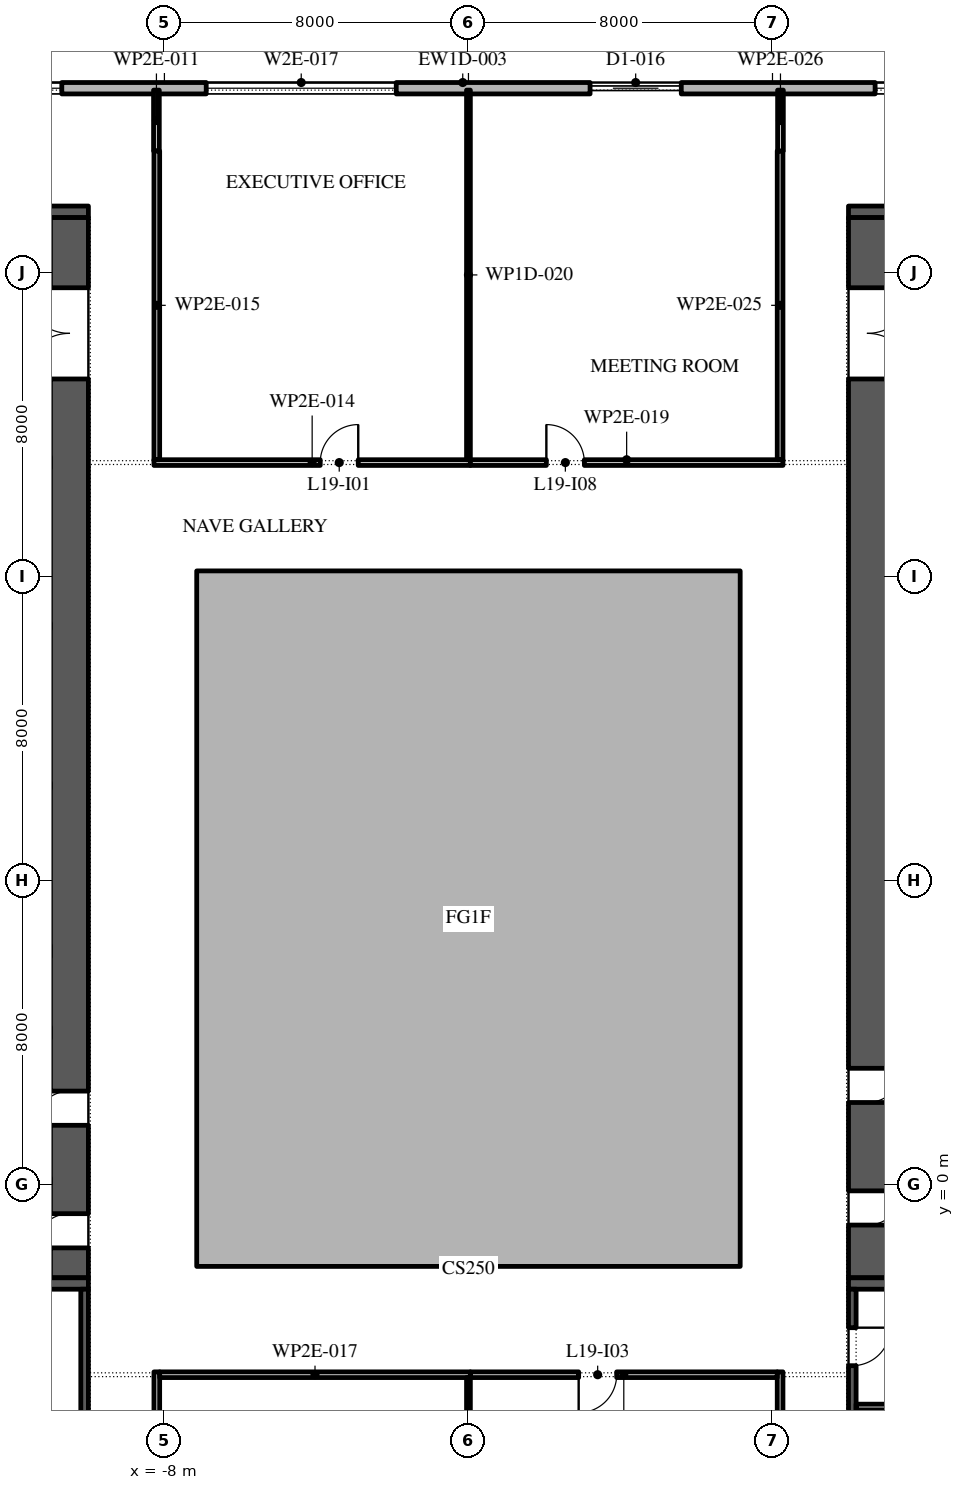
"""IFC4 building model, lengths in metres.
Left out: names, types, materials, properties, quantities, classifications, styles, units other than length and angle.
Written with IfcOpenShell. Run it as: python <this file> out.ifc"""

import sys

from ifc_helpers import new_model, si_unit, direction, frame, frame_2d, origin, place, context, subcontext, project, spatial, polyline, rectangle, outline, extrude, element, fill, save


model = new_model("IFC4")
c1 = context("Model", 3, precision=1e-05, world=origin(), true_north=direction((0.0, 1.0)))
c2 = subcontext(c1, "Body", "Model", "MODEL_VIEW")
j1 = project(units=[si_unit("LENGTHUNIT", "METRE"), si_unit("PLANEANGLEUNIT", "RADIAN")], contexts=[c1])
p1 = place(None, origin())
s1 = spatial("IfcSite", under=j1, at=p1, CompositionType="ELEMENT")
p2 = place(p1, origin())
s2 = spatial("IfcBuilding", under=s1, at=p2, CompositionType="ELEMENT")
p3 = place(p2, frame((0.0, 0.0, 90.0)))
s3 = spatial("IfcBuildingStorey", under=s2, at=p3, CompositionType="ELEMENT", Elevation=90.0)
p4 = place(p3, origin())
e1 = element("IfcWall", 1, at=p4, inside=s3, PredefinedType="STANDARD", context=c2, shape_type="SweptSolid", body=[
    extrude(outline(polyline([(-7.15, -2.15), (7.15, -2.15), (7.15, 16.15), (-7.15, 16.15), (-7.15, -2.15)]), holes=[polyline([(-7.0, -2.0), (-7.0, 16.0), (7.0, 16.0), (7.0, -2.0), (-7.0, -2.0)])]), origin(), (0.0, 0.0, 1.0), 3.9),
])
p5 = place(p3, frame((26.1, 28.85, 0.0), z_axis=(0.0, 0.0, 1.0), x_axis=(-1.0, 0.0, 0.0)))
e2 = element("IfcWall", 2, at=p5, inside=s3, PredefinedType="STANDARD", context=c2, shape_type="SweptSolid", body=[
    extrude(rectangle(XDim=52.5, YDim=0.3, at=frame_2d((26.25, 0.0))), origin(), (0.0, 0.0, 1.0), 3.9),
])
p6 = place(p5, frame((1.75, 0.0, 0.45)))
e3 = element("IfcOpeningElement", 3, at=p6, cuts=e2, PredefinedType="OPENING", context=c2, shape_type="SweptSolid", body=[
    extrude(rectangle(XDim=5.0, YDim=2.775, at=frame_2d((2.5, 1.387))), frame((0.0, 0.16, 0.0), z_axis=(0.0, -1.0, 0.0), x_axis=(1.0, 0.0, 0.0)), (0.0, 0.0, 1.0), 0.32),
])
p7 = place(p5, frame((10.4, 0.0, 0.45)))
e4 = element("IfcOpeningElement", 4, at=p7, cuts=e2, PredefinedType="OPENING", context=c2, shape_type="SweptSolid", body=[
    extrude(rectangle(XDim=5.0, YDim=2.775, at=frame_2d((2.5, 1.387))), frame((0.0, 0.16, 0.0), z_axis=(0.0, -1.0, 0.0), x_axis=(1.0, 0.0, 0.0)), (0.0, 0.0, 1.0), 0.32),
])
p8 = place(p5, frame((20.5, 0.0, 0.0)))
e5 = element("IfcOpeningElement", 5, at=p8, cuts=e2, PredefinedType="OPENING", context=c2, shape_type="SweptSolid", body=[
    extrude(rectangle(XDim=2.4, YDim=3.5, at=frame_2d((1.2, 1.75))), frame((0.0, 0.16, 0.0), z_axis=(0.0, -1.0, 0.0), x_axis=(1.0, 0.0, 0.0)), (0.0, 0.0, 1.0), 0.32),
])
p9 = place(p5, frame((28.0, 0.0, 0.45)))
e6 = element("IfcOpeningElement", 6, at=p9, cuts=e2, PredefinedType="OPENING", context=c2, shape_type="SweptSolid", body=[
    extrude(rectangle(XDim=5.0, YDim=2.775, at=frame_2d((2.5, 1.387))), frame((0.0, 0.16, 0.0), z_axis=(0.0, -1.0, 0.0), x_axis=(1.0, 0.0, 0.0)), (0.0, 0.0, 1.0), 0.32),
])
p10 = place(p5, frame((36.8, 0.0, 0.45)))
e7 = element("IfcOpeningElement", 7, at=p10, cuts=e2, PredefinedType="OPENING", context=c2, shape_type="SweptSolid", body=[
    extrude(rectangle(XDim=5.0, YDim=2.775, at=frame_2d((2.5, 1.387))), frame((0.0, 0.16, 0.0), z_axis=(0.0, -1.0, 0.0), x_axis=(1.0, 0.0, 0.0)), (0.0, 0.0, 1.0), 0.32),
])
p11 = place(p5, frame((45.6, 0.0, 0.45)))
e8 = element("IfcOpeningElement", 8, at=p11, cuts=e2, PredefinedType="OPENING", context=c2, shape_type="SweptSolid", body=[
    extrude(rectangle(XDim=5.0, YDim=2.775, at=frame_2d((2.5, 1.387))), frame((0.0, 0.16, 0.0), z_axis=(0.0, -1.0, 0.0), x_axis=(1.0, 0.0, 0.0)), (0.0, 0.0, 1.0), 0.32),
])
p12 = place(p3, frame((-10.5, -2.45, 0.0), z_axis=(0.0, 0.0, 1.0), x_axis=(0.0, 1.0, 0.0)))
e9 = element("IfcWall", 9, at=p12, inside=s3, PredefinedType="SHEAR", context=c2, shape_type="SweptSolid", body=[
    extrude(rectangle(XDim=27.9, YDim=1.0, at=frame_2d((13.95, 0.0))), origin(), (0.0, 0.0, 1.0), 3.9),
])
p13 = place(p12, frame((23.65, 0.0, 0.0)))
e10 = element("IfcOpeningElement", 10, at=p13, cuts=e9, PredefinedType="OPENING", context=c2, shape_type="SweptSolid", body=[
    extrude(rectangle(XDim=2.4, YDim=2.1, at=frame_2d((1.2, 1.05))), frame((0.0, 0.51, 0.0), z_axis=(0.0, -1.0, 0.0), x_axis=(1.0, 0.0, 0.0)), (0.0, 0.0, 1.0), 1.02),
])
p14 = place(p12, frame((0.788, 0.0, 0.0)))
e11 = element("IfcOpeningElement", 11, at=p14, cuts=e9, PredefinedType="OPENING", context=c2, shape_type="SweptSolid", body=[
    extrude(rectangle(XDim=0.9, YDim=2.1, at=frame_2d((0.45, 1.05))), frame((0.0, 0.51, 0.0), z_axis=(0.0, -1.0, 0.0), x_axis=(1.0, 0.0, 0.0)), (0.0, 0.0, 1.0), 1.02),
])
p15 = place(p12, frame((4.012, 0.0, 0.0)))
e12 = element("IfcOpeningElement", 12, at=p15, cuts=e9, PredefinedType="OPENING", context=c2, shape_type="SweptSolid", body=[
    extrude(rectangle(XDim=0.9, YDim=2.1, at=frame_2d((0.45, 1.05))), frame((0.0, 0.51, 0.0), z_axis=(0.0, -1.0, 0.0), x_axis=(1.0, 0.0, 0.0)), (0.0, 0.0, 1.0), 1.02),
])
for number, where, z_axis, x_axis in (
    (13, (-22.0, -2.6, 0.0), (0.0, 0.0, 1.0), (1.0, 0.0, 0.0)),
    (14, (-22.0, 25.6, 0.0), (0.0, 0.0, 1.0), (1.0, 0.0, 0.0)),
):
    element("IfcWall", number, at=place(p3, frame(where, z_axis=z_axis, x_axis=x_axis)), inside=s3, PredefinedType="SHEAR", context=c2, shape_type="SweptSolid", body=[
        extrude(rectangle(XDim=12.0, YDim=0.3, at=frame_2d((6.0, 0.0))), origin(), (0.0, 0.0, 1.0), 3.9),
    ])
p16 = place(p3, frame((-10.1, -15.8, 0.0), z_axis=(0.0, 0.0, 1.0), x_axis=(0.0, 1.0, 0.0)))
e15 = element("IfcWall", 15, at=p16, inside=s3, PredefinedType="SHEAR", context=c2, shape_type="SweptSolid", body=[
    extrude(rectangle(XDim=13.05, YDim=0.2, at=frame_2d((6.525, 0.0))), origin(), (0.0, 0.0, 1.0), 3.9),
])
p17 = place(p16, frame((6.075, 0.0, 0.0)))
e16 = element("IfcOpeningElement", 16, at=p17, cuts=e15, PredefinedType="OPENING", context=c2, shape_type="SweptSolid", body=[
    extrude(rectangle(XDim=0.9, YDim=2.1, at=frame_2d((0.45, 1.05))), frame((0.0, 0.11, 0.0), z_axis=(0.0, -1.0, 0.0), x_axis=(1.0, 0.0, 0.0)), (0.0, 0.0, 1.0), 0.22),
])
p18 = place(p3, frame((10.5, -2.45, 0.0), z_axis=(0.0, 0.0, 1.0), x_axis=(0.0, 1.0, 0.0)))
e17 = element("IfcWall", 17, at=p18, inside=s3, PredefinedType="SHEAR", context=c2, shape_type="SweptSolid", body=[
    extrude(rectangle(XDim=27.9, YDim=1.0, at=frame_2d((13.95, 0.0))), origin(), (0.0, 0.0, 1.0), 3.9),
])
p19 = place(p18, frame((23.65, 0.0, 0.0)))
e18 = element("IfcOpeningElement", 18, at=p19, cuts=e17, PredefinedType="OPENING", context=c2, shape_type="SweptSolid", body=[
    extrude(rectangle(XDim=2.4, YDim=2.1, at=frame_2d((1.2, 1.05))), frame((0.0, 0.51, 0.0), z_axis=(0.0, -1.0, 0.0), x_axis=(1.0, 0.0, 0.0)), (0.0, 0.0, 1.0), 1.02),
])
p20 = place(p18, frame((1.387, 0.0, 0.0)))
e19 = element("IfcOpeningElement", 19, at=p20, cuts=e17, PredefinedType="OPENING", context=c2, shape_type="SweptSolid", body=[
    extrude(rectangle(XDim=0.9, YDim=2.1, at=frame_2d((0.45, 1.05))), frame((0.0, 0.51, 0.0), z_axis=(0.0, -1.0, 0.0), x_axis=(1.0, 0.0, 0.0)), (0.0, 0.0, 1.0), 1.02),
])
p21 = place(p18, frame((4.613, 0.0, 0.0)))
e20 = element("IfcOpeningElement", 20, at=p21, cuts=e17, PredefinedType="OPENING", context=c2, shape_type="SweptSolid", body=[
    extrude(rectangle(XDim=0.9, YDim=2.1, at=frame_2d((0.45, 1.05))), frame((0.0, 0.51, 0.0), z_axis=(0.0, -1.0, 0.0), x_axis=(1.0, 0.0, 0.0)), (0.0, 0.0, 1.0), 1.02),
])
for number, where, z_axis, x_axis in (
    (21, (10.0, -2.6, 0.0), (0.0, 0.0, 1.0), (1.0, 0.0, 0.0)),
    (22, (10.0, 25.6, 0.0), (0.0, 0.0, 1.0), (1.0, 0.0, 0.0)),
):
    element("IfcWall", number, at=place(p3, frame(where, z_axis=z_axis, x_axis=x_axis)), inside=s3, PredefinedType="SHEAR", context=c2, shape_type="SweptSolid", body=[
        extrude(rectangle(XDim=12.0, YDim=0.3, at=frame_2d((6.0, 0.0))), origin(), (0.0, 0.0, 1.0), 3.9),
    ])
p22 = place(p3, frame((10.1, -15.8, 0.0), z_axis=(0.0, 0.0, 1.0), x_axis=(0.0, 1.0, 0.0)))
e23 = element("IfcWall", 23, at=p22, inside=s3, PredefinedType="SHEAR", context=c2, shape_type="SweptSolid", body=[
    extrude(rectangle(XDim=13.05, YDim=0.2, at=frame_2d((6.525, 0.0))), origin(), (0.0, 0.0, 1.0), 3.9),
])
p23 = place(p22, frame((4.488, 0.0, 0.0)))
e24 = element("IfcOpeningElement", 24, at=p23, cuts=e23, PredefinedType="OPENING", context=c2, shape_type="SweptSolid", body=[
    extrude(rectangle(XDim=0.9, YDim=2.1, at=frame_2d((0.45, 1.05))), frame((0.0, 0.11, 0.0), z_axis=(0.0, -1.0, 0.0), x_axis=(1.0, 0.0, 0.0)), (0.0, 0.0, 1.0), 0.22),
])
p24 = place(p22, frame((11.038, 0.0, 0.0)))
e25 = element("IfcOpeningElement", 25, at=p24, cuts=e23, PredefinedType="OPENING", context=c2, shape_type="SweptSolid", body=[
    extrude(rectangle(XDim=1.0, YDim=2.1, at=frame_2d((0.5, 1.05))), frame((0.0, 0.11, 0.0), z_axis=(0.0, -1.0, 0.0), x_axis=(1.0, 0.0, 0.0)), (0.0, 0.0, 1.0), 0.22),
])
p25 = place(p3, frame((10.2, -5.85, 0.0), z_axis=(0.0, 0.0, 1.0), x_axis=(1.0, 0.0, 0.0)))
e26 = element("IfcWall", 26, at=p25, inside=s3, PredefinedType="PARTITIONING", context=c2, shape_type="SweptSolid", body=[
    extrude(rectangle(XDim=11.6, YDim=0.15, at=frame_2d((5.8, 0.0))), origin(), (0.0, 0.0, 1.0), 3.9),
])
p26 = place(p3, frame((-8.21, 28.8, 0.0), z_axis=(0.0, 0.0, 1.0), x_axis=(0.0, -1.0, 0.0)))
e27 = element("IfcWall", 27, at=p26, inside=s3, PredefinedType="PARTITIONING", context=c2, shape_type="SweptSolid", body=[
    extrude(rectangle(XDim=1.6, YDim=0.15, at=frame_2d((0.8, 0.0))), origin(), (0.0, 0.0, 1.0), 3.9),
])
p27 = place(p3, frame((-8.2, -4.925, 0.0), z_axis=(0.0, 0.0, 1.0), x_axis=(0.0, -1.0, 0.0)))
e28 = element("IfcWall", 28, at=p27, inside=s3, PredefinedType="PARTITIONING", context=c2, shape_type="SweptSolid", body=[
    extrude(rectangle(XDim=12.8, YDim=0.15, at=frame_2d((6.4, 0.0))), origin(), (0.0, 0.0, 1.0), 3.9),
])
p28 = place(p27, frame((5.975, 0.0, 0.0)))
e29 = element("IfcOpeningElement", 29, at=p28, cuts=e28, PredefinedType="OPENING", context=c2, shape_type="SweptSolid", body=[
    extrude(rectangle(XDim=1.0, YDim=2.1, at=frame_2d((0.5, 1.05))), frame((0.0, 0.085, 0.0), z_axis=(0.0, -1.0, 0.0), x_axis=(1.0, 0.0, 0.0)), (0.0, 0.0, 1.0), 0.17),
])
p29 = place(p3, frame((-8.275, 19.0, 0.0), z_axis=(0.0, 0.0, 1.0), x_axis=(1.0, 0.0, 0.0)))
e30 = element("IfcWall", 30, at=p29, inside=s3, PredefinedType="PARTITIONING", context=c2, shape_type="SweptSolid", body=[
    extrude(rectangle(XDim=8.325, YDim=0.15, at=frame_2d((4.163, 0.0))), origin(), (0.0, 0.0, 1.0), 3.9),
])
p30 = place(p29, frame((4.375, 0.0, 0.0)))
e31 = element("IfcOpeningElement", 31, at=p30, cuts=e30, PredefinedType="OPENING", context=c2, shape_type="SweptSolid", body=[
    extrude(rectangle(XDim=1.0, YDim=2.1, at=frame_2d((0.5, 1.05))), frame((0.0, 0.085, 0.0), z_axis=(0.0, -1.0, 0.0), x_axis=(1.0, 0.0, 0.0)), (0.0, 0.0, 1.0), 0.17),
])
p31 = place(p3, frame((-8.2, 27.2, 0.0), z_axis=(0.0, 0.0, 1.0), x_axis=(0.0, -1.0, 0.0)))
e32 = element("IfcWall", 32, at=p31, inside=s3, PredefinedType="PARTITIONING", context=c2, shape_type="SweptSolid", body=[
    extrude(rectangle(XDim=8.125, YDim=0.15, at=frame_2d((4.062, 0.0))), origin(), (0.0, 0.0, 1.0), 3.9),
])
p32 = place(p3, frame((0.05, -5.0, 0.0), z_axis=(0.0, 0.0, 1.0), x_axis=(-1.0, 0.0, 0.0)))
e33 = element("IfcWall", 33, at=p32, inside=s3, PredefinedType="PARTITIONING", context=c2, shape_type="SweptSolid", body=[
    extrude(rectangle(XDim=8.175, YDim=0.15, at=frame_2d((4.087, 0.0))), origin(), (0.0, 0.0, 1.0), 3.9),
])
p33 = place(p3, frame((0.0, -5.075, 0.0), z_axis=(0.0, 0.0, 1.0), x_axis=(0.0, -1.0, 0.0)))
e34 = element("IfcWall", 34, at=p33, inside=s3, PredefinedType="PARTITIONING", context=c2, shape_type="SweptSolid", body=[
    extrude(rectangle(XDim=5.045, YDim=0.1, at=frame_2d((2.522, 0.0))), origin(), (0.0, 0.0, 1.0), 3.9),
])
p34 = place(p3, frame((0.05, 19.0, 0.0), z_axis=(0.0, 0.0, 1.0), x_axis=(1.0, 0.0, 0.0)))
e35 = element("IfcWall", 35, at=p34, inside=s3, PredefinedType="PARTITIONING", context=c2, shape_type="SweptSolid", body=[
    extrude(rectangle(XDim=8.225, YDim=0.15, at=frame_2d((4.112, 0.0))), origin(), (0.0, 0.0, 1.0), 3.9),
])
p35 = place(p34, frame((2.0, 0.0, 0.0)))
e36 = element("IfcOpeningElement", 36, at=p35, cuts=e35, PredefinedType="OPENING", context=c2, shape_type="SweptSolid", body=[
    extrude(rectangle(XDim=1.0, YDim=2.1, at=frame_2d((0.5, 1.05))), frame((0.0, 0.085, 0.0), z_axis=(0.0, -1.0, 0.0), x_axis=(1.0, 0.0, 0.0)), (0.0, 0.0, 1.0), 0.17),
])
p36 = place(p3, frame((0.0, 28.8, 0.0), z_axis=(0.0, 0.0, 1.0), x_axis=(0.0, -1.0, 0.0)))
e37 = element("IfcWall", 37, at=p36, inside=s3, PredefinedType="PARTITIONING", context=c2, shape_type="SweptSolid", body=[
    extrude(rectangle(XDim=9.725, YDim=0.1, at=frame_2d((4.863, 0.0))), origin(), (0.0, 0.0, 1.0), 3.9),
])
p37 = place(p3, frame((8.2, -10.12, 0.0), z_axis=(0.0, 0.0, 1.0), x_axis=(0.0, 1.0, 0.0)))
e38 = element("IfcWall", 38, at=p37, inside=s3, PredefinedType="PARTITIONING", context=c2, shape_type="SweptSolid", body=[
    extrude(rectangle(XDim=5.195, YDim=0.15, at=frame_2d((2.598, 0.0))), origin(), (0.0, 0.0, 1.0), 3.9),
])
p38 = place(p3, frame((8.125, -5.0, 0.0), z_axis=(0.0, 0.0, 1.0), x_axis=(-1.0, 0.0, 0.0)))
e39 = element("IfcWall", 39, at=p38, inside=s3, PredefinedType="PARTITIONING", context=c2, shape_type="SweptSolid", body=[
    extrude(rectangle(XDim=8.075, YDim=0.15, at=frame_2d((4.038, 0.0))), origin(), (0.0, 0.0, 1.0), 3.9),
])
p39 = place(p38, frame((4.225, 0.0, 0.0)))
e40 = element("IfcOpeningElement", 40, at=p39, cuts=e39, PredefinedType="OPENING", context=c2, shape_type="SweptSolid", body=[
    extrude(rectangle(XDim=1.0, YDim=2.1, at=frame_2d((0.5, 1.05))), frame((0.0, 0.085, 0.0), z_axis=(0.0, -1.0, 0.0), x_axis=(1.0, 0.0, 0.0)), (0.0, 0.0, 1.0), 0.17),
])
p40 = place(p3, frame((8.2, 19.075, 0.0), z_axis=(0.0, 0.0, 1.0), x_axis=(0.0, 1.0, 0.0)))
e41 = element("IfcWall", 41, at=p40, inside=s3, PredefinedType="PARTITIONING", context=c2, shape_type="SweptSolid", body=[
    extrude(rectangle(XDim=8.125, YDim=0.15, at=frame_2d((4.062, 0.0))), origin(), (0.0, 0.0, 1.0), 3.9),
])
p41 = place(p3, frame((8.21, 27.2, 0.0), z_axis=(0.0, 0.0, 1.0), x_axis=(0.0, 1.0, 0.0)))
e42 = element("IfcWall", 42, at=p41, inside=s3, PredefinedType="PARTITIONING", context=c2, shape_type="SweptSolid", body=[
    extrude(rectangle(XDim=1.6, YDim=0.15, at=frame_2d((0.8, 0.0))), origin(), (0.0, 0.0, 1.0), 3.9),
])
p42 = place(p7, origin())
e43 = element("IfcWindow", 43, at=p42, inside=s3, PartitioningType="DOUBLE_PANEL_VERTICAL", PredefinedType="WINDOW", context=c2, shape_type="SweptSolid", body=[
    extrude(rectangle(XDim=5.0, YDim=2.775, at=frame_2d((2.5, 1.387))), frame((0.0, 0.03, 0.0), z_axis=(0.0, -1.0, 0.0), x_axis=(1.0, 0.0, 0.0)), (0.0, 0.0, 1.0), 0.06),
])
fill(e4, e43)
p43 = place(p8, origin())
e44 = element("IfcDoor", 44, at=p43, inside=s3, OperationType="DOUBLE_DOOR_SLIDING", PredefinedType="DOOR", context=c2, shape_type="SweptSolid", body=[
    extrude(rectangle(XDim=2.4, YDim=3.5, at=frame_2d((1.2, 1.75))), frame((0.0, 0.025, 0.0), z_axis=(0.0, -1.0, 0.0), x_axis=(1.0, 0.0, 0.0)), (0.0, 0.0, 1.0), 0.05),
])
fill(e5, e44)
p44 = place(p9, origin())
e45 = element("IfcWindow", 45, at=p44, inside=s3, PartitioningType="DOUBLE_PANEL_VERTICAL", PredefinedType="WINDOW", context=c2, shape_type="SweptSolid", body=[
    extrude(rectangle(XDim=5.0, YDim=2.775, at=frame_2d((2.5, 1.387))), frame((0.0, 0.03, 0.0), z_axis=(0.0, -1.0, 0.0), x_axis=(1.0, 0.0, 0.0)), (0.0, 0.0, 1.0), 0.06),
])
fill(e6, e45)
p45 = place(p10, origin())
e46 = element("IfcWindow", 46, at=p45, inside=s3, PartitioningType="DOUBLE_PANEL_VERTICAL", PredefinedType="WINDOW", context=c2, shape_type="SweptSolid", body=[
    extrude(rectangle(XDim=5.0, YDim=2.775, at=frame_2d((2.5, 1.387))), frame((0.0, 0.03, 0.0), z_axis=(0.0, -1.0, 0.0), x_axis=(1.0, 0.0, 0.0)), (0.0, 0.0, 1.0), 0.06),
])
fill(e7, e46)
p46 = place(p13, origin())
e47 = element("IfcDoor", 47, at=p46, inside=s3, OperationType="DOUBLE_DOOR_SINGLE_SWING", PredefinedType="DOOR", context=c2, shape_type="SweptSolid", body=[
    extrude(rectangle(XDim=2.4, YDim=2.1, at=frame_2d((1.2, 1.05))), frame((0.0, 0.025, 0.0), z_axis=(0.0, -1.0, 0.0), x_axis=(1.0, 0.0, 0.0)), (0.0, 0.0, 1.0), 0.05),
])
fill(e10, e47)
p47 = place(p19, frame((2.4, 0.0, 0.0), z_axis=(0.0, 0.0, 1.0), x_axis=(-1.0, 0.0, 0.0)))
e48 = element("IfcDoor", 48, at=p47, inside=s3, OperationType="DOUBLE_DOOR_SINGLE_SWING", PredefinedType="DOOR", context=c2, shape_type="SweptSolid", body=[
    extrude(rectangle(XDim=2.4, YDim=2.1, at=frame_2d((1.2, 1.05))), frame((0.0, 0.025, 0.0), z_axis=(0.0, -1.0, 0.0), x_axis=(1.0, 0.0, 0.0)), (0.0, 0.0, 1.0), 0.05),
])
fill(e18, e48)
p48 = place(p24, frame((1.0, -0.15, 0.0), z_axis=(0.0, 0.0, 1.0), x_axis=(-1.0, 0.0, 0.0)))
e49 = element("IfcDoor", 49, at=p48, inside=s3, OperationType="SINGLE_SWING_RIGHT", PredefinedType="DOOR", context=c2, shape_type="SweptSolid", body=[
    extrude(rectangle(XDim=1.0, YDim=2.1, at=frame_2d((0.5, 1.05))), frame((0.0, -0.05, 0.0), z_axis=(0.0, -1.0, 0.0), x_axis=(1.0, 0.0, 0.0)), (0.0, 0.0, 1.0), 0.05),
])
fill(e25, e49)
p49 = place(p30, origin())
e50 = element("IfcDoor", 50, at=p49, inside=s3, OperationType="SINGLE_SWING_LEFT", PredefinedType="DOOR", context=c2, shape_type="SweptSolid", body=[
    extrude(rectangle(XDim=1.0, YDim=2.1, at=frame_2d((0.5, 1.05))), frame((0.0, 0.025, 0.0), z_axis=(0.0, -1.0, 0.0), x_axis=(1.0, 0.0, 0.0)), (0.0, 0.0, 1.0), 0.05),
])
fill(e31, e50)
p50 = place(p39, origin())
e51 = element("IfcDoor", 51, at=p50, inside=s3, OperationType="SINGLE_SWING_LEFT", PredefinedType="DOOR", context=c2, shape_type="SweptSolid", body=[
    extrude(rectangle(XDim=1.0, YDim=2.1, at=frame_2d((0.5, 1.05))), frame((0.0, 0.025, 0.0), z_axis=(0.0, -1.0, 0.0), x_axis=(1.0, 0.0, 0.0)), (0.0, 0.0, 1.0), 0.05),
])
fill(e40, e51)
p51 = place(p35, origin())
e52 = element("IfcDoor", 52, at=p51, inside=s3, OperationType="SINGLE_SWING_RIGHT", PredefinedType="DOOR", context=c2, shape_type="SweptSolid", body=[
    extrude(rectangle(XDim=1.0, YDim=2.1, at=frame_2d((0.5, 1.05))), frame((0.0, 0.025, 0.0), z_axis=(0.0, -1.0, 0.0), x_axis=(1.0, 0.0, 0.0)), (0.0, 0.0, 1.0), 0.05),
])
fill(e36, e52)
save(model, sys.argv[1])
